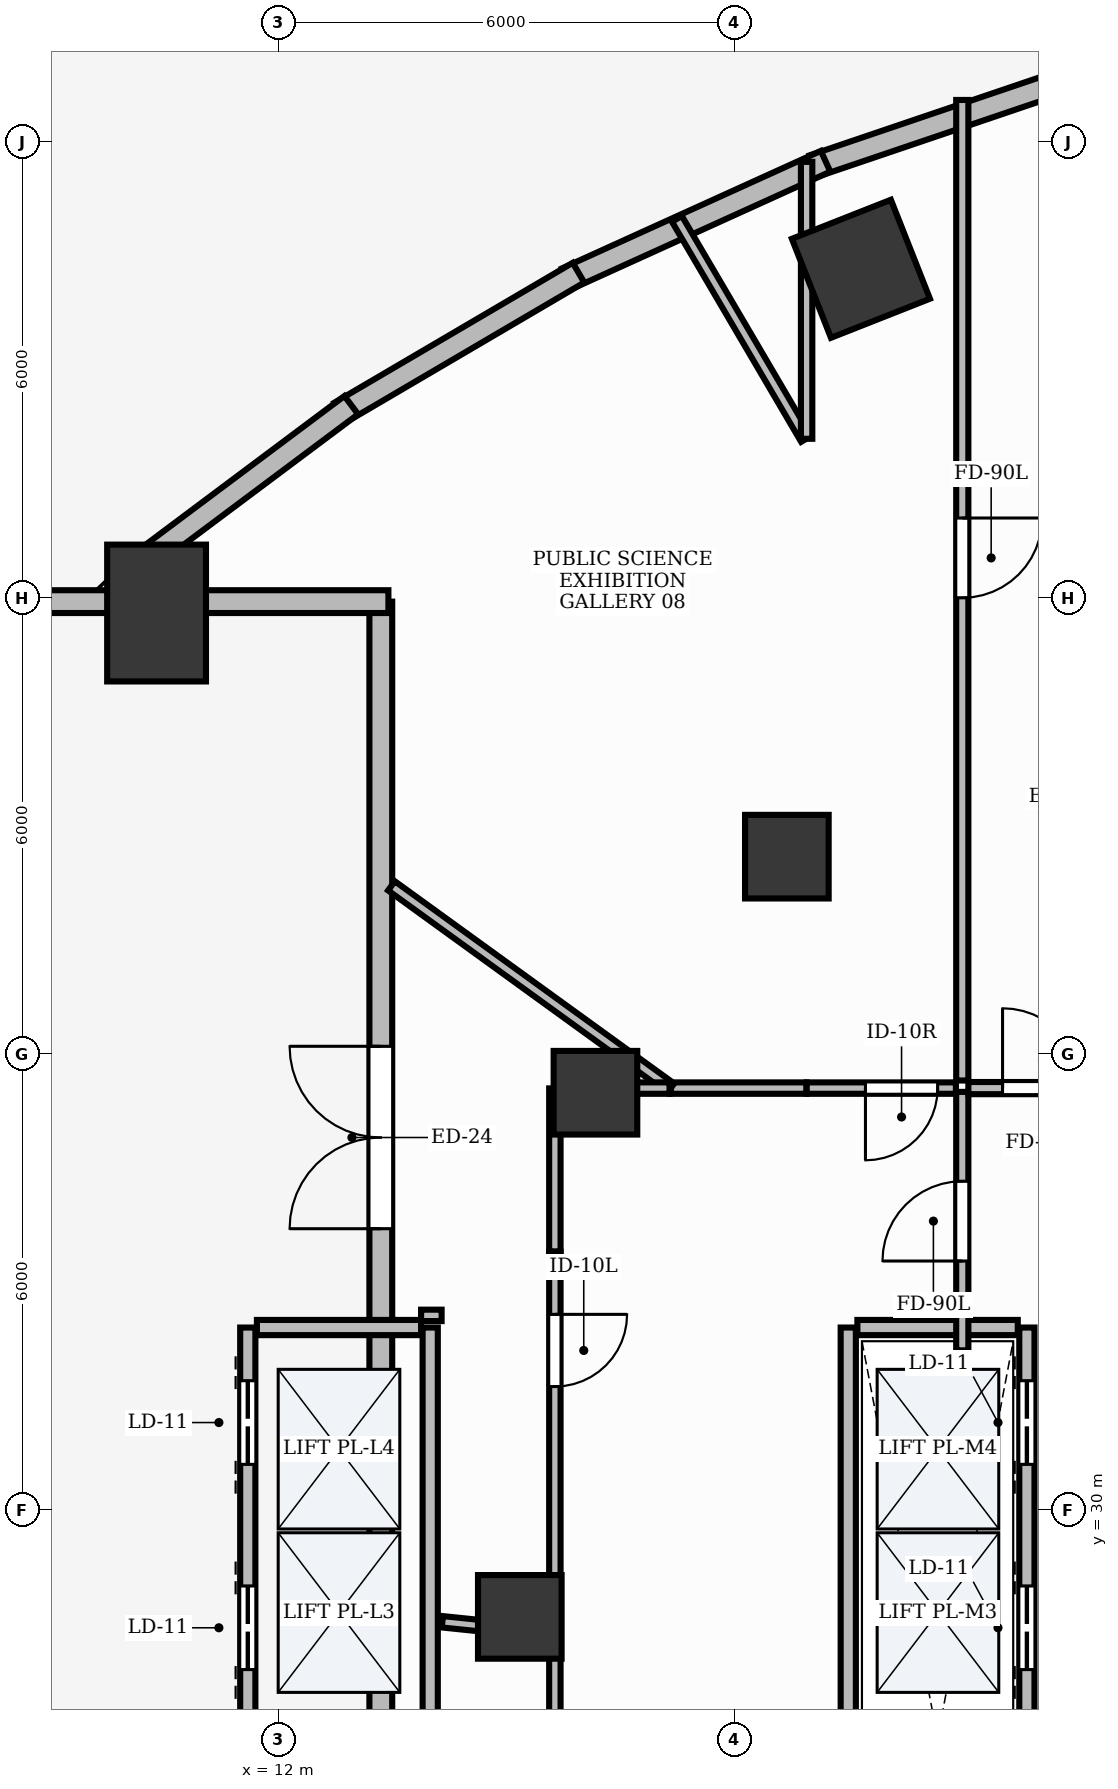
"""IFC4 building model, lengths in metres.
Left out: names, types, materials, properties, quantities, classifications, styles, units other than length and angle.
Written with IfcOpenShell. Run it as: python <this file> out.ifc"""

import sys

from ifc_helpers import new_model, si_unit, direction, frame, frame_2d, origin, origin_2d, place, context, subcontext, project, spatial, rectangle, extrude, element, fill, save


model = new_model("IFC4")
c1 = context("Model", 3, precision=1e-05, world=origin(), true_north=direction((0.0, 1.0)))
c2 = subcontext(c1, "Body", "Model", "MODEL_VIEW")
j1 = project(units=[si_unit("LENGTHUNIT", "METRE"), si_unit("PLANEANGLEUNIT", "RADIAN")], contexts=[c1])
p1 = place(None, origin())
s1 = spatial("IfcSite", under=j1, at=p1, CompositionType="ELEMENT")
p2 = place(p1, origin())
s2 = spatial("IfcBuilding", under=s1, at=p2, CompositionType="ELEMENT")
p3 = place(p2, origin())
s3 = spatial("IfcBuildingStorey", under=s2, at=p3, CompositionType="ELEMENT", Elevation=0.0)
p4 = place(p3, frame((10.4, 41.8, 0.0), z_axis=(0.0, 0.0, 1.0), x_axis=(1.0, 0.0, 0.0)))
e1 = element("IfcColumn", 1, at=p4, inside=s3, PredefinedType="PILASTER", context=c2, shape_type="SweptSolid", body=[
    extrude(rectangle(XDim=1.3, YDim=1.8, at=origin_2d()), origin(), (0.0, 0.0, 1.0), 5.08),
])
p5 = place(p3, frame((19.667, 46.329, -0.0), z_axis=(0.0, 0.0, 1.0), x_axis=(0.930225540858, 0.366988341962, 0.0)))
e2 = element("IfcColumn", 2, at=p5, inside=s3, PredefinedType="COLUMN", context=c2, shape_type="SweptSolid", body=[
    extrude(rectangle(XDim=1.4, YDim=1.4, at=origin_2d()), origin(), (0.0, 0.0, 1.0), 5.101),
])
for number, where, z_axis, x_axis in (
    (3, (18.692, 38.595, -0.0), (0.0, 0.0, 1.0), (1.0, 0.0, 0.0)),
    (4, (16.174, 35.489, -0.0), (0.0, 0.0, 1.0), (1.0, 0.0, 0.0)),
    (5, (15.179, 28.594, -0.0), (0.0, 0.0, 1.0), (1.0, 0.0, 0.0)),
):
    element("IfcColumn", number, at=place(p3, frame(where, z_axis=z_axis, x_axis=x_axis)), inside=s3, PredefinedType="COLUMN", context=c2, shape_type="SweptSolid", body=[
        extrude(rectangle(XDim=1.1, YDim=1.1, at=origin_2d()), origin(), (0.0, 0.0, 1.0), 5.101),
    ])
p6 = place(p3, frame((22.667, 48.909, 0.0), z_axis=(0.0, 0.0, 1.0), x_axis=(-0.94702579403, -0.321157508773, 0.0)))
e6 = element("IfcWall", 6, at=p6, inside=s3, PredefinedType="STANDARD", context=c2, shape_type="SweptSolid", body=[
    extrude(rectangle(XDim=3.83, YDim=0.3, at=frame_2d((1.915, 0.0))), origin(), (0.0, 0.0, 1.0), 5.1),
])
p7 = place(p3, frame((19.201, 47.743, 0.0), z_axis=(0.0, 0.0, 1.0), x_axis=(-0.910623406862, -0.413237233166, 0.0)))
e7 = element("IfcWall", 7, at=p7, inside=s3, PredefinedType="STANDARD", context=c2, shape_type="SweptSolid", body=[
    extrude(rectangle(XDim=3.74, YDim=0.3, at=frame_2d((1.87, 0.0))), origin(), (0.0, 0.0, 1.0), 5.1),
])
p8 = place(p3, frame((15.951, 46.278, 0.0), z_axis=(0.0, 0.0, 1.0), x_axis=(-0.8624654944, -0.506115867139, 0.0)))
e8 = element("IfcWall", 8, at=p8, inside=s3, PredefinedType="STANDARD", context=c2, shape_type="SweptSolid", body=[
    extrude(rectangle(XDim=3.635, YDim=0.3, at=frame_2d((1.818, 0.0))), origin(), (0.0, 0.0, 1.0), 5.1),
])
p9 = place(p3, frame((12.961, 44.535, 0.0), z_axis=(0.0, 0.0, 1.0), x_axis=(-0.800823020995, -0.598901067827, 0.0)))
e9 = element("IfcWall", 9, at=p9, inside=s3, PredefinedType="STANDARD", context=c2, shape_type="SweptSolid", body=[
    extrude(rectangle(XDim=3.521, YDim=0.3, at=frame_2d((1.76, 0.0))), origin(), (0.0, 0.0, 1.0), 5.1),
])
p10 = place(p3, frame((13.35, 12.05, 0.0), z_axis=(0.0, 0.0, 1.0), x_axis=(0.0, 1.0, 0.0)))
e10 = element("IfcWall", 10, at=p10, inside=s3, PredefinedType="STANDARD", context=c2, shape_type="SweptSolid", body=[
    extrude(rectangle(XDim=29.9, YDim=0.3, at=frame_2d((14.95, 0.0))), origin(), (0.0, 0.0, 1.0), 5.1),
])
p11 = place(p10, frame((5.65, 0.0, 0.0)))
e11 = element("IfcOpeningElement", 11, at=p11, cuts=e10, PredefinedType="OPENING", context=c2, shape_type="SweptSolid", body=[
    extrude(rectangle(XDim=2.4, YDim=2.7, at=frame_2d((1.2, 1.35))), frame((0.0, 0.165, 0.0), z_axis=(0.0, -1.0, 0.0), x_axis=(1.0, 0.0, 0.0)), (0.0, 0.0, 1.0), 0.33),
])
p12 = place(p10, frame((21.65, 0.0, 0.0)))
e12 = element("IfcOpeningElement", 12, at=p12, cuts=e10, PredefinedType="OPENING", context=c2, shape_type="SweptSolid", body=[
    extrude(rectangle(XDim=2.4, YDim=2.7, at=frame_2d((1.2, 1.35))), frame((0.0, 0.165, 0.0), z_axis=(0.0, -1.0, 0.0), x_axis=(1.0, 0.0, 0.0)), (0.0, 0.0, 1.0), 0.33),
])
p13 = place(p3, frame((8.6, 41.95, 0.0), z_axis=(0.0, 0.0, 1.0), x_axis=(1.0, 0.0, 0.0)))
e13 = element("IfcWall", 13, at=p13, inside=s3, PredefinedType="STANDARD", context=c2, shape_type="SweptSolid", body=[
    extrude(rectangle(XDim=4.85, YDim=0.3, at=frame_2d((2.425, 0.0))), origin(), (0.0, 0.0, 1.0), 5.1),
])
p14 = place(p3, frame((11.6, 21.6, 0.0), z_axis=(0.0, 0.0, 1.0), x_axis=(0.0, 1.0, 0.0)))
e14 = element("IfcWall", 14, at=p14, inside=s3, PredefinedType="PARTITIONING", context=c2, shape_type="SweptSolid", body=[
    extrude(rectangle(XDim=10.8, YDim=0.2, at=frame_2d((5.4, 0.0))), origin(), (0.0, 0.0, 1.0), 4.11),
])
p15 = place(p14, frame((0.9, 0.0, 0.0)))
e15 = element("IfcOpeningElement", 15, at=p15, cuts=e14, PredefinedType="OPENING", context=c2, shape_type="SweptSolid", body=[
    extrude(rectangle(XDim=1.1, YDim=2.2, at=frame_2d((0.55, 1.1))), frame((0.0, 0.115, 0.0), z_axis=(0.0, -1.0, 0.0), x_axis=(1.0, 0.0, 0.0)), (0.0, 0.0, 1.0), 0.23),
])
p16 = place(p14, frame((3.6, 0.0, 0.0)))
e16 = element("IfcOpeningElement", 16, at=p16, cuts=e14, PredefinedType="OPENING", context=c2, shape_type="SweptSolid", body=[
    extrude(rectangle(XDim=1.1, YDim=2.2, at=frame_2d((0.55, 1.1))), frame((0.0, 0.115, 0.0), z_axis=(0.0, -1.0, 0.0), x_axis=(1.0, 0.0, 0.0)), (0.0, 0.0, 1.0), 0.23),
])
p17 = place(p14, frame((6.3, 0.0, 0.0)))
e17 = element("IfcOpeningElement", 17, at=p17, cuts=e14, PredefinedType="OPENING", context=c2, shape_type="SweptSolid", body=[
    extrude(rectangle(XDim=1.1, YDim=2.2, at=frame_2d((0.55, 1.1))), frame((0.0, 0.115, 0.0), z_axis=(0.0, -1.0, 0.0), x_axis=(1.0, 0.0, 0.0)), (0.0, 0.0, 1.0), 0.23),
])
p18 = place(p14, frame((9.0, 0.0, 0.0)))
e18 = element("IfcOpeningElement", 18, at=p18, cuts=e14, PredefinedType="OPENING", context=c2, shape_type="SweptSolid", body=[
    extrude(rectangle(XDim=1.1, YDim=2.2, at=frame_2d((0.55, 1.1))), frame((0.0, 0.115, 0.0), z_axis=(0.0, -1.0, 0.0), x_axis=(1.0, 0.0, 0.0)), (0.0, 0.0, 1.0), 0.23),
])
p19 = place(p3, frame((14.0, 21.6, 0.0), z_axis=(0.0, 0.0, 1.0), x_axis=(0.0, 1.0, 0.0)))
e19 = element("IfcWall", 19, at=p19, inside=s3, PredefinedType="PARTITIONING", context=c2, shape_type="SweptSolid", body=[
    extrude(rectangle(XDim=10.8, YDim=0.2, at=frame_2d((5.4, 0.0))), origin(), (0.0, 0.0, 1.0), 4.11),
])
p20 = place(p3, frame((11.72, 32.4, 0.0), z_axis=(0.0, 0.0, 1.0), x_axis=(1.0, 0.0, 0.0)))
e20 = element("IfcWall", 20, at=p20, inside=s3, PredefinedType="PARTITIONING", context=c2, shape_type="SweptSolid", body=[
    extrude(rectangle(XDim=2.16, YDim=0.2, at=frame_2d((1.08, 0.0))), origin(), (0.0, 0.0, 1.0), 4.11),
])
p21 = place(p3, frame((19.5, 21.6, 0.0), z_axis=(0.0, 0.0, 1.0), x_axis=(0.0, 1.0, 0.0)))
e21 = element("IfcWall", 21, at=p21, inside=s3, PredefinedType="PARTITIONING", context=c2, shape_type="SweptSolid", body=[
    extrude(rectangle(XDim=10.8, YDim=0.2, at=frame_2d((5.4, 0.0))), origin(), (0.0, 0.0, 1.0), 4.11),
])
p22 = place(p3, frame((21.85, 21.6, 0.0), z_axis=(0.0, 0.0, 1.0), x_axis=(0.0, 1.0, 0.0)))
e22 = element("IfcWall", 22, at=p22, inside=s3, PredefinedType="PARTITIONING", context=c2, shape_type="SweptSolid", body=[
    extrude(rectangle(XDim=10.8, YDim=0.2, at=frame_2d((5.4, 0.0))), origin(), (0.0, 0.0, 1.0), 4.11),
])
p23 = place(p22, frame((0.9, 0.0, 0.0)))
e23 = element("IfcOpeningElement", 23, at=p23, cuts=e22, PredefinedType="OPENING", context=c2, shape_type="SweptSolid", body=[
    extrude(rectangle(XDim=1.1, YDim=2.2, at=frame_2d((0.55, 1.1))), frame((0.0, 0.115, 0.0), z_axis=(0.0, -1.0, 0.0), x_axis=(1.0, 0.0, 0.0)), (0.0, 0.0, 1.0), 0.23),
])
p24 = place(p22, frame((3.6, 0.0, 0.0)))
e24 = element("IfcOpeningElement", 24, at=p24, cuts=e22, PredefinedType="OPENING", context=c2, shape_type="SweptSolid", body=[
    extrude(rectangle(XDim=1.1, YDim=2.2, at=frame_2d((0.55, 1.1))), frame((0.0, 0.115, 0.0), z_axis=(0.0, -1.0, 0.0), x_axis=(1.0, 0.0, 0.0)), (0.0, 0.0, 1.0), 0.23),
])
p25 = place(p22, frame((6.3, 0.0, 0.0)))
e25 = element("IfcOpeningElement", 25, at=p25, cuts=e22, PredefinedType="OPENING", context=c2, shape_type="SweptSolid", body=[
    extrude(rectangle(XDim=1.1, YDim=2.2, at=frame_2d((0.55, 1.1))), frame((0.0, 0.115, 0.0), z_axis=(0.0, -1.0, 0.0), x_axis=(1.0, 0.0, 0.0)), (0.0, 0.0, 1.0), 0.23),
])
p26 = place(p22, frame((9.0, 0.0, 0.0)))
e26 = element("IfcOpeningElement", 26, at=p26, cuts=e22, PredefinedType="OPENING", context=c2, shape_type="SweptSolid", body=[
    extrude(rectangle(XDim=1.1, YDim=2.2, at=frame_2d((0.55, 1.1))), frame((0.0, 0.115, 0.0), z_axis=(0.0, -1.0, 0.0), x_axis=(1.0, 0.0, 0.0)), (0.0, 0.0, 1.0), 0.23),
])
p27 = place(p3, frame((19.62, 32.4, 0.0), z_axis=(0.0, 0.0, 1.0), x_axis=(1.0, 0.0, 0.0)))
e27 = element("IfcWall", 27, at=p27, inside=s3, PredefinedType="PARTITIONING", context=c2, shape_type="SweptSolid", body=[
    extrude(rectangle(XDim=2.11, YDim=0.2, at=frame_2d((1.055, 0.0))), origin(), (0.0, 0.0, 1.0), 4.11),
])
p28 = place(p3, frame((21.0, 32.1, 0.0), z_axis=(0.0, 0.0, 1.0), x_axis=(0.0, 1.0, 0.0)))
e28 = element("IfcWall", 28, at=p28, inside=s3, PredefinedType="PARTITIONING", context=c2, shape_type="SweptSolid", body=[
    extrude(rectangle(XDim=3.4, YDim=0.16, at=frame_2d((1.7, 0.0))), origin(), (0.0, 0.0, 1.0), 4.11),
])
p29 = place(p28, frame((1.175, 0.0, 0.0)))
e29 = element("IfcOpeningElement", 29, at=p29, cuts=e28, PredefinedType="OPENING", context=c2, shape_type="SweptSolid", body=[
    extrude(rectangle(XDim=1.05, YDim=2.15, at=frame_2d((0.525, 1.075))), frame((0.0, 0.095, 0.0), z_axis=(0.0, -1.0, 0.0), x_axis=(1.0, 0.0, 0.0)), (0.0, 0.0, 1.0), 0.19),
])
p30 = place(p3, frame((21.08, 35.55, 0.0), z_axis=(0.0, 0.0, 1.0), x_axis=(1.0, 0.0, 0.0)))
e30 = element("IfcWall", 30, at=p30, inside=s3, PredefinedType="PARTITIONING", context=c2, shape_type="SweptSolid", body=[
    extrude(rectangle(XDim=4.62, YDim=0.16, at=frame_2d((2.31, 0.0))), origin(), (0.0, 0.0, 1.0), 4.11),
])
p31 = place(p30, frame((0.45, 0.0, 0.0)))
e31 = element("IfcOpeningElement", 31, at=p31, cuts=e30, PredefinedType="OPENING", context=c2, shape_type="SweptSolid", body=[
    extrude(rectangle(XDim=1.05, YDim=2.15, at=frame_2d((0.525, 1.075))), frame((0.0, 0.095, 0.0), z_axis=(0.0, -1.0, 0.0), x_axis=(1.0, 0.0, 0.0)), (0.0, 0.0, 1.0), 0.19),
])
p32 = place(p3, frame((21.0, 48.55, 0.0), z_axis=(0.0, 0.0, 1.0), x_axis=(0.0, -1.0, 0.0)))
e32 = element("IfcWall", 32, at=p32, inside=s3, PredefinedType="PARTITIONING", context=c2, shape_type="SweptSolid", body=[
    extrude(rectangle(XDim=12.9, YDim=0.16, at=frame_2d((6.45, 0.0))), origin(), (0.0, 0.0, 1.0), 4.11),
])
p33 = place(p32, frame((5.5, 0.0, 0.0)))
e33 = element("IfcOpeningElement", 33, at=p33, cuts=e32, PredefinedType="OPENING", context=c2, shape_type="SweptSolid", body=[
    extrude(rectangle(XDim=1.05, YDim=2.15, at=frame_2d((0.525, 1.075))), frame((0.0, 0.095, 0.0), z_axis=(0.0, -1.0, 0.0), x_axis=(1.0, 0.0, 0.0)), (0.0, 0.0, 1.0), 0.19),
])
p34 = place(p3, frame((15.64, 28.376, 0.0), z_axis=(0.0, 0.0, 1.0), x_axis=(0.0, -1.0, 0.0)))
e34 = element("IfcWall", 34, at=p34, inside=s3, PredefinedType="PARTITIONING", context=c2, shape_type="SweptSolid", body=[
    extrude(rectangle(XDim=6.924, YDim=0.15, at=frame_2d((3.462, 0.0))), origin(), (0.0, 0.0, 1.0), 4.11),
])
p35 = place(p34, frame((3.475, 0.0, 0.0)))
e35 = element("IfcOpeningElement", 35, at=p35, cuts=e34, PredefinedType="OPENING", context=c2, shape_type="SweptSolid", body=[
    extrude(rectangle(XDim=0.95, YDim=2.15, at=frame_2d((0.475, 1.075))), frame((0.0, 0.09, 0.0), z_axis=(0.0, -1.0, 0.0), x_axis=(1.0, 0.0, 0.0)), (0.0, 0.0, 1.0), 0.18),
])
p36 = place(p3, frame((20.916, 35.55, 0.0), z_axis=(0.0, 0.0, 1.0), x_axis=(-1.0, 0.0, 0.0)))
e36 = element("IfcWall", 36, at=p36, inside=s3, PredefinedType="PARTITIONING", context=c2, shape_type="SweptSolid", body=[
    extrude(rectangle(XDim=1.964, YDim=0.15, at=frame_2d((0.982, 0.0))), origin(), (0.0, 0.0, 1.0), 4.11),
])
p37 = place(p36, frame((0.24, 0.0, 0.0)))
e37 = element("IfcOpeningElement", 37, at=p37, cuts=e36, PredefinedType="OPENING", context=c2, shape_type="SweptSolid", body=[
    extrude(rectangle(XDim=0.95, YDim=2.15, at=frame_2d((0.475, 1.075))), frame((0.0, 0.09, 0.0), z_axis=(0.0, -1.0, 0.0), x_axis=(1.0, 0.0, 0.0)), (0.0, 0.0, 1.0), 0.18),
])
p38 = place(p3, frame((15.64, 33.398, 0.0), z_axis=(0.0, 0.0, 1.0), x_axis=(0.0, -1.0, 0.0)))
e38 = element("IfcWall", 38, at=p38, inside=s3, PredefinedType="PARTITIONING", context=c2, shape_type="SweptSolid", body=[
    extrude(rectangle(XDim=5.012, YDim=0.15, at=frame_2d((2.506, 0.0))), origin(), (0.0, 0.0, 1.0), 4.11),
])
p39 = place(p38, frame((0.825, 0.0, 0.0)))
e39 = element("IfcOpeningElement", 39, at=p39, cuts=e38, PredefinedType="OPENING", context=c2, shape_type="SweptSolid", body=[
    extrude(rectangle(XDim=0.95, YDim=2.15, at=frame_2d((0.475, 1.075))), frame((0.0, 0.09, 0.0), z_axis=(0.0, -1.0, 0.0), x_axis=(1.0, 0.0, 0.0)), (0.0, 0.0, 1.0), 0.18),
])
p40 = place(p3, frame((14.16, 28.529, 0.0), z_axis=(0.0, 0.0, 1.0), x_axis=(0.994708578353, -0.102736771168, 0.0)))
e40 = element("IfcWall", 40, at=p40, inside=s3, PredefinedType="PARTITIONING", context=c2, shape_type="SweptSolid", body=[
    extrude(rectangle(XDim=1.488, YDim=0.15, at=frame_2d((0.744, 0.0))), origin(), (0.0, 0.0, 1.0), 4.11),
])
p41 = place(p3, frame((17.246, 46.986, 0.0), z_axis=(0.0, 0.0, 1.0), x_axis=(0.506044184909, -0.862507555282, 0.0)))
e41 = element("IfcWall", 41, at=p41, inside=s3, PredefinedType="PARTITIONING", context=c2, shape_type="SweptSolid", body=[
    extrude(rectangle(XDim=3.357, YDim=0.15, at=frame_2d((1.679, 0.0))), origin(), (0.0, 0.0, 1.0), 4.11),
])
p42 = place(p3, frame((18.952, 44.092, 0.0), z_axis=(0.0, 0.0, 1.0), x_axis=(0.0, 1.0, 0.0)))
e42 = element("IfcWall", 42, at=p42, inside=s3, PredefinedType="PARTITIONING", context=c2, shape_type="SweptSolid", body=[
    extrude(rectangle(XDim=3.643, YDim=0.15, at=frame_2d((1.821, 0.0))), origin(), (0.0, 0.0, 1.0), 4.11),
])
p43 = place(p3, frame((18.948, 35.55, 0.0), z_axis=(0.0, 0.0, 1.0), x_axis=(-1.0, 0.0, 0.0)))
e43 = element("IfcWall", 43, at=p43, inside=s3, PredefinedType="PARTITIONING", context=c2, shape_type="SweptSolid", body=[
    extrude(rectangle(XDim=1.782, YDim=0.15, at=frame_2d((0.891, 0.0))), origin(), (0.0, 0.0, 1.0), 4.11),
])
p44 = place(p3, frame((17.166, 35.55, 0.0), z_axis=(0.0, 0.0, 1.0), x_axis=(-0.81004170459, 0.586372268125, 0.0)))
e44 = element("IfcWall", 44, at=p44, inside=s3, PredefinedType="PARTITIONING", context=c2, shape_type="SweptSolid", body=[
    extrude(rectangle(XDim=4.537, YDim=0.15, at=frame_2d((2.269, 0.0))), origin(), (0.0, 0.0, 1.0), 4.11),
])
p45 = place(p3, frame((15.64, 35.546, 0.0), z_axis=(0.0, 0.0, 1.0), x_axis=(0.0, -1.0, 0.0)))
e45 = element("IfcWall", 45, at=p45, inside=s3, PredefinedType="PARTITIONING", context=c2, shape_type="SweptSolid", body=[
    extrude(rectangle(XDim=2.144, YDim=0.15, at=frame_2d((1.072, 0.0))), origin(), (0.0, 0.0, 1.0), 4.11),
])
p46 = place(p3, frame((14.15, 32.56, 0.0), z_axis=(0.0, 0.0, 1.0), x_axis=(-1.0, 0.0, 0.0)))
e46 = element("IfcWall", 46, at=p46, inside=s3, PredefinedType="PARTITIONING", context=c2, shape_type="SweptSolid", body=[
    extrude(rectangle(XDim=0.27, YDim=0.15, at=frame_2d((0.135, 0.0))), origin(), (0.0, 0.0, 1.0), 4.11),
])
p47 = place(p3, frame((17.149, 35.55, 0.0), z_axis=(0.0, 0.0, 1.0), x_axis=(-1.0, 0.0, 0.0)))
e47 = element("IfcWall", 47, at=p47, inside=s3, PredefinedType="PARTITIONING", context=c2, shape_type="SweptSolid", body=[
    extrude(rectangle(XDim=1.505, YDim=0.15, at=frame_2d((0.752, 0.0))), origin(), (0.0, 0.0, 1.0), 4.11),
])
p48 = place(p12, origin())
e48 = element("IfcDoor", 48, at=p48, inside=s3, OperationType="DOUBLE_DOOR_SINGLE_SWING", PredefinedType="DOOR", context=c2, shape_type="SweptSolid", body=[
    extrude(rectangle(XDim=2.4, YDim=2.7, at=frame_2d((1.2, 1.35))), frame((0.0, 0.025, 0.0), z_axis=(0.0, -1.0, 0.0), x_axis=(1.0, 0.0, 0.0)), (0.0, 0.0, 1.0), 0.05),
])
fill(e12, e48)
p49 = place(p17, origin())
e49 = element("IfcDoor", 49, at=p49, inside=s3, OperationType="DOUBLE_DOOR_SLIDING", PredefinedType="DOOR", context=c2, shape_type="SweptSolid", body=[
    extrude(rectangle(XDim=1.1, YDim=2.2, at=frame_2d((0.55, 1.1))), frame((0.0, 0.025, 0.0), z_axis=(0.0, -1.0, 0.0), x_axis=(1.0, 0.0, 0.0)), (0.0, 0.0, 1.0), 0.05),
])
fill(e17, e49)
p50 = place(p18, origin())
e50 = element("IfcDoor", 50, at=p50, inside=s3, OperationType="DOUBLE_DOOR_SLIDING", PredefinedType="DOOR", context=c2, shape_type="SweptSolid", body=[
    extrude(rectangle(XDim=1.1, YDim=2.2, at=frame_2d((0.55, 1.1))), frame((0.0, 0.025, 0.0), z_axis=(0.0, -1.0, 0.0), x_axis=(1.0, 0.0, 0.0)), (0.0, 0.0, 1.0), 0.05),
])
fill(e18, e50)
p51 = place(p25, origin())
e51 = element("IfcDoor", 51, at=p51, inside=s3, OperationType="DOUBLE_DOOR_SLIDING", PredefinedType="DOOR", context=c2, shape_type="SweptSolid", body=[
    extrude(rectangle(XDim=1.1, YDim=2.2, at=frame_2d((0.55, 1.1))), frame((0.0, 0.025, 0.0), z_axis=(0.0, -1.0, 0.0), x_axis=(1.0, 0.0, 0.0)), (0.0, 0.0, 1.0), 0.05),
])
fill(e25, e51)
p52 = place(p26, origin())
e52 = element("IfcDoor", 52, at=p52, inside=s3, OperationType="DOUBLE_DOOR_SLIDING", PredefinedType="DOOR", context=c2, shape_type="SweptSolid", body=[
    extrude(rectangle(XDim=1.1, YDim=2.2, at=frame_2d((0.55, 1.1))), frame((0.0, 0.025, 0.0), z_axis=(0.0, -1.0, 0.0), x_axis=(1.0, 0.0, 0.0)), (0.0, 0.0, 1.0), 0.05),
])
fill(e26, e52)
p53 = place(p29, origin())
e53 = element("IfcDoor", 53, at=p53, inside=s3, OperationType="SINGLE_SWING_LEFT", PredefinedType="DOOR", context=c2, shape_type="SweptSolid", body=[
    extrude(rectangle(XDim=1.05, YDim=2.15, at=frame_2d((0.525, 1.075))), frame((0.0, 0.025, 0.0), z_axis=(0.0, -1.0, 0.0), x_axis=(1.0, 0.0, 0.0)), (0.0, 0.0, 1.0), 0.05),
])
fill(e29, e53)
p54 = place(p31, origin())
e54 = element("IfcDoor", 54, at=p54, inside=s3, OperationType="SINGLE_SWING_LEFT", PredefinedType="DOOR", context=c2, shape_type="SweptSolid", body=[
    extrude(rectangle(XDim=1.05, YDim=2.15, at=frame_2d((0.525, 1.075))), frame((0.0, 0.025, 0.0), z_axis=(0.0, -1.0, 0.0), x_axis=(1.0, 0.0, 0.0)), (0.0, 0.0, 1.0), 0.05),
])
fill(e31, e54)
p55 = place(p33, origin())
e55 = element("IfcDoor", 55, at=p55, inside=s3, OperationType="SINGLE_SWING_LEFT", PredefinedType="DOOR", context=c2, shape_type="SweptSolid", body=[
    extrude(rectangle(XDim=1.05, YDim=2.15, at=frame_2d((0.525, 1.075))), frame((0.0, 0.025, 0.0), z_axis=(0.0, -1.0, 0.0), x_axis=(1.0, 0.0, 0.0)), (0.0, 0.0, 1.0), 0.05),
])
fill(e33, e55)
p56 = place(p37, origin())
e56 = element("IfcDoor", 56, at=p56, inside=s3, OperationType="SINGLE_SWING_RIGHT", PredefinedType="DOOR", context=c2, shape_type="SweptSolid", body=[
    extrude(rectangle(XDim=0.95, YDim=2.15, at=frame_2d((0.475, 1.075))), frame((0.0, 0.025, 0.0), z_axis=(0.0, -1.0, 0.0), x_axis=(1.0, 0.0, 0.0)), (0.0, 0.0, 1.0), 0.05),
])
fill(e37, e56)
p57 = place(p39, origin())
e57 = element("IfcDoor", 57, at=p57, inside=s3, OperationType="SINGLE_SWING_LEFT", PredefinedType="DOOR", context=c2, shape_type="SweptSolid", body=[
    extrude(rectangle(XDim=0.95, YDim=2.15, at=frame_2d((0.475, 1.075))), frame((0.0, 0.025, 0.0), z_axis=(0.0, -1.0, 0.0), x_axis=(1.0, 0.0, 0.0)), (0.0, 0.0, 1.0), 0.05),
])
fill(e39, e57)
save(model, sys.argv[1])
